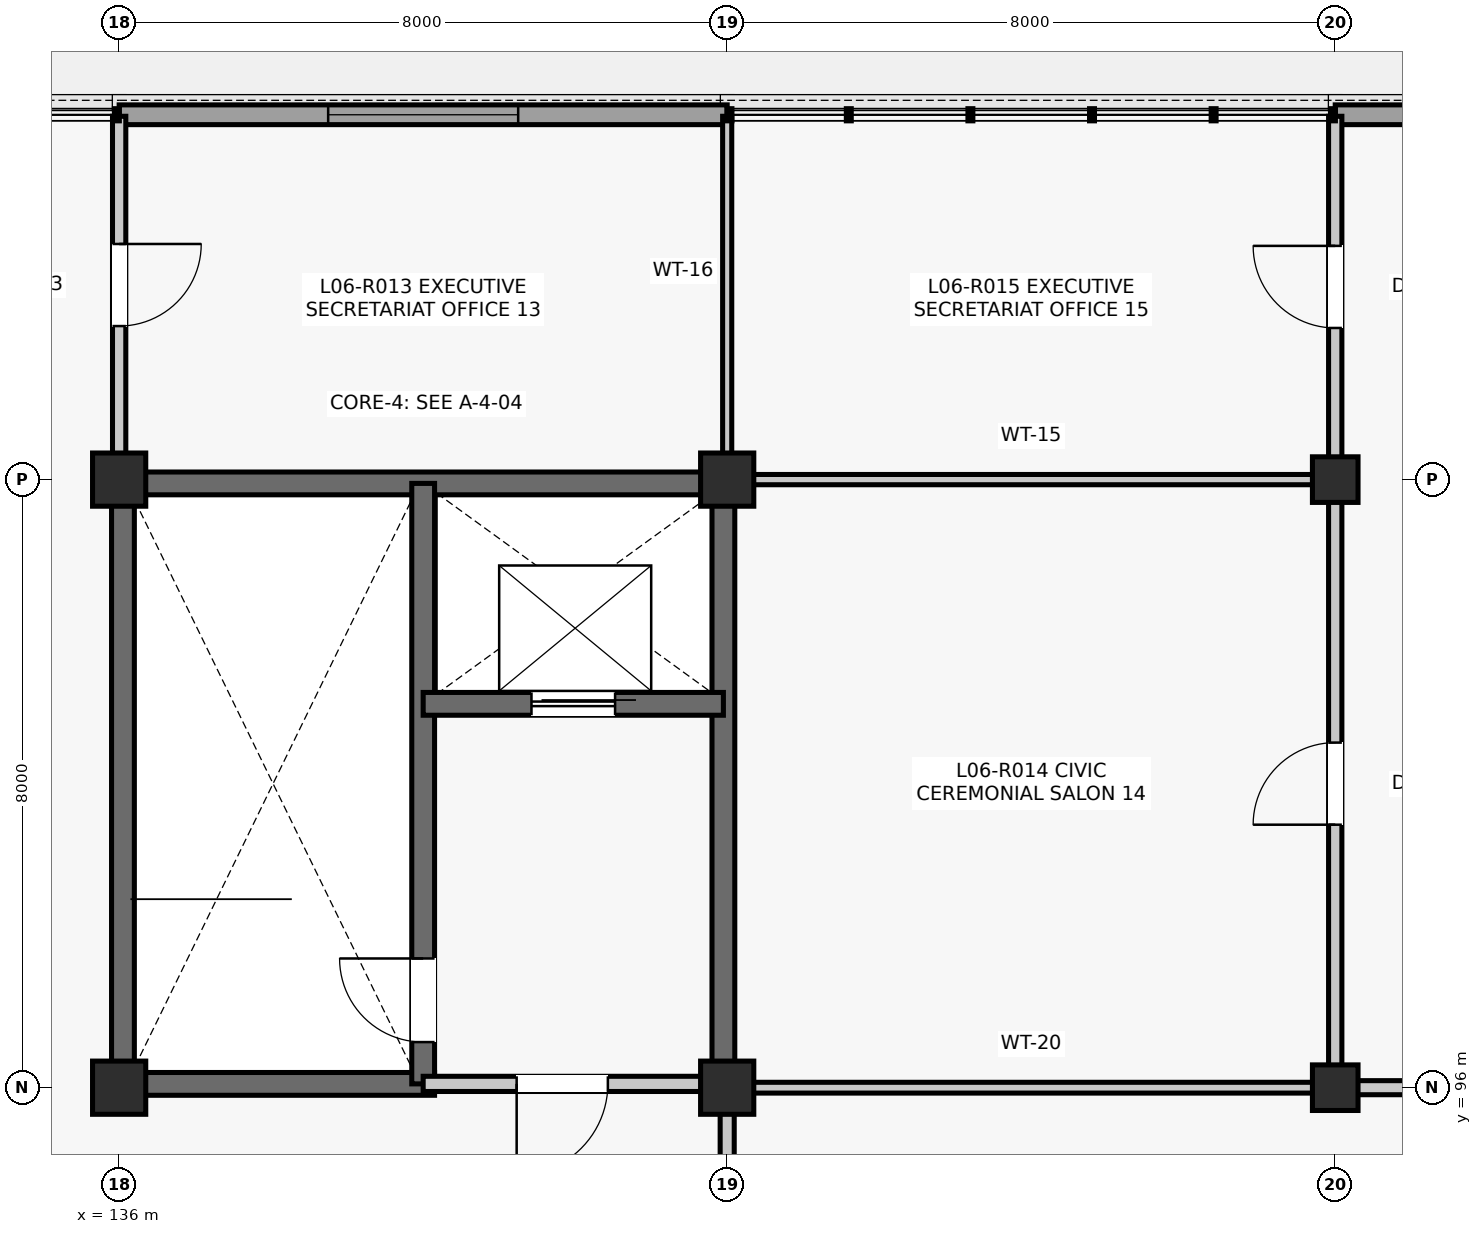
"""IFC4 building model, lengths in metres.
Left out: names, types, materials, properties, quantities, classifications, styles, units other than length and angle.
Written with IfcOpenShell. Run it as: python <this file> out.ifc"""

import sys

from ifc_helpers import new_model, si_unit, direction, frame, frame_2d, origin, origin_2d, place, context, subcontext, project, spatial, rectangle, extrude, element, fill, save


model = new_model("IFC4")
c1 = context("Model", 3, precision=1e-05, world=origin(), true_north=direction((0.0, 1.0)))
c2 = subcontext(c1, "Body", "Model", "MODEL_VIEW")
j1 = project(units=[si_unit("LENGTHUNIT", "METRE"), si_unit("PLANEANGLEUNIT", "RADIAN")], contexts=[c1])
p1 = place(None, origin())
s1 = spatial("IfcSite", under=j1, at=p1, CompositionType="ELEMENT")
p2 = place(p1, origin())
s2 = spatial("IfcBuilding", under=s1, at=p2, CompositionType="ELEMENT")
p3 = place(p2, frame((0.0, 0.0, 25.74)))
s3 = spatial("IfcBuildingStorey", under=s2, at=p3, CompositionType="ELEMENT", Elevation=25.74)
for number, where, z_axis, x_axis in (
    (1, (136.0, 96.0, 0.0), (0.0, 0.0, 1.0), (1.0, 0.0, 0.0)),
    (2, (136.0, 104.0, 0.0), (0.0, 0.0, 1.0), (1.0, 0.0, 0.0)),
    (3, (144.0, 96.0, 0.0), (0.0, 0.0, 1.0), (1.0, 0.0, 0.0)),
    (4, (144.0, 104.0, 0.0), (0.0, 0.0, 1.0), (1.0, 0.0, 0.0)),
):
    element("IfcColumn", number, at=place(p3, frame(where, z_axis=z_axis, x_axis=x_axis)), inside=s3, PredefinedType="COLUMN", context=c2, shape_type="SweptSolid", body=[
        extrude(rectangle(XDim=0.7, YDim=0.7, at=origin_2d()), origin(), (0.0, 0.0, 1.0), 4.29),
    ])
for number, where, z_axis, x_axis in (
    (5, (152.0, 96.0, 0.0), (0.0, 0.0, 1.0), (1.0, 0.0, 0.0)),
    (6, (152.0, 104.0, 0.0), (0.0, 0.0, 1.0), (1.0, 0.0, 0.0)),
):
    element("IfcColumn", number, at=place(p3, frame(where, z_axis=z_axis, x_axis=x_axis)), inside=s3, PredefinedType="COLUMN", context=c2, shape_type="SweptSolid", body=[
        extrude(rectangle(XDim=0.6, YDim=0.6, at=origin_2d()), origin(), (0.0, 0.0, 1.0), 4.29),
    ])
p4 = place(p3, frame((136.0, 108.8, 0.0), z_axis=(0.0, 0.0, 1.0), x_axis=(1.0, 0.0, 0.0)))
e7 = element("IfcWall", 7, at=p4, inside=s3, PredefinedType="SOLIDWALL", context=c2, shape_type="SweptSolid", body=[
    extrude(rectangle(XDim=8.0, YDim=0.26, at=frame_2d((4.0, 0.0))), origin(), (0.0, 0.0, 1.0), 4.09),
])
p5 = place(p4, frame((2.75, 0.0, 0.85)))
e8 = element("IfcOpeningElement", 8, at=p5, cuts=e7, PredefinedType="OPENING", context=c2, shape_type="SweptSolid", body=[
    extrude(rectangle(XDim=2.5, YDim=2.2, at=frame_2d((1.25, 1.1))), frame((0.0, 0.14, 0.0), z_axis=(0.0, -1.0, 0.0), x_axis=(1.0, 0.0, 0.0)), (0.0, 0.0, 1.0), 0.28),
])
p6 = place(p3, frame((152.0, 108.8, 0.0), z_axis=(0.0, 0.0, 1.0), x_axis=(1.0, 0.0, 0.0)))
e9 = element("IfcWall", 9, at=p6, inside=s3, PredefinedType="SOLIDWALL", context=c2, shape_type="SweptSolid", body=[
    extrude(rectangle(XDim=8.0, YDim=0.26, at=frame_2d((4.0, 0.0))), origin(), (0.0, 0.0, 1.0), 4.09),
])
p7 = place(p6, frame((2.75, 0.0, 0.85)))
e10 = element("IfcOpeningElement", 10, at=p7, cuts=e9, PredefinedType="OPENING", context=c2, shape_type="SweptSolid", body=[
    extrude(rectangle(XDim=2.5, YDim=2.2, at=frame_2d((1.25, 1.1))), frame((0.0, 0.14, 0.0), z_axis=(0.0, -1.0, 0.0), x_axis=(1.0, 0.0, 0.0)), (0.0, 0.0, 1.0), 0.28),
])
for number, where, z_axis, x_axis in (
    (11, (136.05, 96.24, 0.0), (0.0, 0.0, 1.0), (0.0, 1.0, 0.0)),
    (12, (136.24, 103.95, 0.0), (0.0, 0.0, 1.0), (1.0, 0.0, 0.0)),
    (13, (143.95, 96.24, 0.0), (0.0, 0.0, 1.0), (0.0, 1.0, 0.0)),
):
    element("IfcWall", number, at=place(p3, frame(where, z_axis=z_axis, x_axis=x_axis)), inside=s3, PredefinedType="SHEAR", context=c2, shape_type="SweptSolid", body=[
        extrude(rectangle(XDim=7.52, YDim=0.3, at=frame_2d((3.76, 0.0))), origin(), (0.0, 0.0, 1.0), 4.09),
    ])
p8 = place(p3, frame((136.24, 96.05, 0.0), z_axis=(0.0, 0.0, 1.0), x_axis=(1.0, 0.0, 0.0)))
e14 = element("IfcWall", 14, at=p8, inside=s3, PredefinedType="SHEAR", context=c2, shape_type="SweptSolid", body=[
    extrude(rectangle(XDim=3.91, YDim=0.3, at=frame_2d((1.955, 0.0))), origin(), (0.0, 0.0, 1.0), 4.09),
])
p9 = place(p3, frame((140.0, 96.05, 0.0), z_axis=(0.0, 0.0, 1.0), x_axis=(0.0, 1.0, 0.0)))
e15 = element("IfcWall", 15, at=p9, inside=s3, PredefinedType="SHEAR", context=c2, shape_type="SweptSolid", body=[
    extrude(rectangle(XDim=7.9, YDim=0.3, at=frame_2d((3.95, 0.0))), origin(), (0.0, 0.0, 1.0), 4.09),
])
p10 = place(p9, frame((0.55, 0.0, 0.0)))
e16 = element("IfcOpeningElement", 16, at=p10, cuts=e15, PredefinedType="OPENING", context=c2, shape_type="SweptSolid", body=[
    extrude(rectangle(XDim=1.1, YDim=2.15, at=frame_2d((0.55, 1.075))), frame((0.0, 0.16, 0.0), z_axis=(0.0, -1.0, 0.0), x_axis=(1.0, 0.0, 0.0)), (0.0, 0.0, 1.0), 0.32),
])
p11 = place(p3, frame((140.0, 101.05, 0.0), z_axis=(0.0, 0.0, 1.0), x_axis=(1.0, 0.0, 0.0)))
e17 = element("IfcWall", 17, at=p11, inside=s3, PredefinedType="SHEAR", context=c2, shape_type="SweptSolid", body=[
    extrude(rectangle(XDim=3.95, YDim=0.3, at=frame_2d((1.975, 0.0))), origin(), (0.0, 0.0, 1.0), 4.09),
])
p12 = place(p11, frame((1.425, 0.0, 0.0)))
e18 = element("IfcOpeningElement", 18, at=p12, cuts=e17, PredefinedType="OPENING", context=c2, shape_type="SweptSolid", body=[
    extrude(rectangle(XDim=1.1, YDim=2.2, at=frame_2d((0.55, 1.1))), frame((0.0, 0.16, 0.0), z_axis=(0.0, -1.0, 0.0), x_axis=(1.0, 0.0, 0.0)), (0.0, 0.0, 1.0), 0.32),
])
p13 = place(p3, frame((140.0, 96.05, 0.0), z_axis=(0.0, 0.0, 1.0), x_axis=(1.0, 0.0, 0.0)))
e19 = element("IfcWall", 19, at=p13, inside=s3, PredefinedType="PARTITIONING", context=c2, shape_type="SweptSolid", body=[
    extrude(rectangle(XDim=3.66, YDim=0.2, at=frame_2d((1.83, 0.0))), origin(), (0.0, 0.0, 1.0), 3.408),
])
p14 = place(p13, frame((1.23, 0.0, 0.0)))
e20 = element("IfcOpeningElement", 20, at=p14, cuts=e19, PredefinedType="OPENING", context=c2, shape_type="SweptSolid", body=[
    extrude(rectangle(XDim=1.2, YDim=2.15, at=frame_2d((0.6, 1.075))), frame((0.0, 0.11, 0.0), z_axis=(0.0, -1.0, 0.0), x_axis=(1.0, 0.0, 0.0)), (0.0, 0.0, 1.0), 0.22),
])
p15 = place(p3, frame((136.0, 104.34, 0.0), z_axis=(0.0, 0.0, 1.0), x_axis=(0.0, 1.0, 0.0)))
e21 = element("IfcWall", 21, at=p15, inside=s3, PredefinedType="PARTITIONING", context=c2, shape_type="SweptSolid", body=[
    extrude(rectangle(XDim=4.44, YDim=0.175, at=frame_2d((2.22, 0.0))), origin(), (0.0, 0.0, 1.0), 3.408),
])
p16 = place(p15, frame((1.68, 0.0, 0.0)))
e22 = element("IfcOpeningElement", 22, at=p16, cuts=e21, PredefinedType="OPENING", context=c2, shape_type="SweptSolid", body=[
    extrude(rectangle(XDim=1.08, YDim=2.2, at=frame_2d((0.54, 1.1))), frame((0.0, 0.097, 0.0), z_axis=(0.0, -1.0, 0.0), x_axis=(1.0, 0.0, 0.0)), (0.0, 0.0, 1.0), 0.195),
])
p17 = place(p3, frame((144.0, 91.22, 0.0), z_axis=(0.0, 0.0, 1.0), x_axis=(0.0, 1.0, 0.0)))
e23 = element("IfcWall", 23, at=p17, inside=s3, PredefinedType="PARTITIONING", context=c2, shape_type="SweptSolid", body=[
    extrude(rectangle(XDim=4.44, YDim=0.185, at=frame_2d((2.22, 0.0))), origin(), (0.0, 0.0, 1.0), 3.408),
])
p18 = place(p17, frame((1.32, 0.0, 0.0)))
e24 = element("IfcOpeningElement", 24, at=p18, cuts=e23, PredefinedType="OPENING", context=c2, shape_type="SweptSolid", body=[
    extrude(rectangle(XDim=1.8, YDim=2.35, at=frame_2d((0.9, 1.175))), frame((0.0, 0.103, 0.0), z_axis=(0.0, -1.0, 0.0), x_axis=(1.0, 0.0, 0.0)), (0.0, 0.0, 1.0), 0.205),
])
p19 = place(p3, frame((144.0, 104.34, 0.0), z_axis=(0.0, 0.0, 1.0), x_axis=(0.0, 1.0, 0.0)))
e25 = element("IfcWall", 25, at=p19, inside=s3, PredefinedType="PARTITIONING", context=c2, shape_type="SweptSolid", body=[
    extrude(rectangle(XDim=4.44, YDim=0.12, at=frame_2d((2.22, 0.0))), origin(), (0.0, 0.0, 1.0), 3.408),
])
p20 = place(p3, frame((144.34, 96.0, 0.0), z_axis=(0.0, 0.0, 1.0), x_axis=(1.0, 0.0, 0.0)))
e26 = element("IfcWall", 26, at=p20, inside=s3, PredefinedType="PARTITIONING", context=c2, shape_type="SweptSolid", body=[
    extrude(rectangle(XDim=7.37, YDim=0.142, at=frame_2d((3.685, 0.0))), origin(), (0.0, 0.0, 1.0), 3.408),
])
p21 = place(p3, frame((152.0, 96.29, 0.0), z_axis=(0.0, 0.0, 1.0), x_axis=(0.0, 1.0, 0.0)))
e27 = element("IfcWall", 27, at=p21, inside=s3, PredefinedType="PARTITIONING", context=c2, shape_type="SweptSolid", body=[
    extrude(rectangle(XDim=7.42, YDim=0.175, at=frame_2d((3.71, 0.0))), origin(), (0.0, 0.0, 1.0), 3.408),
])
p22 = place(p21, frame((3.17, 0.0, 0.0)))
e28 = element("IfcOpeningElement", 28, at=p22, cuts=e27, PredefinedType="OPENING", context=c2, shape_type="SweptSolid", body=[
    extrude(rectangle(XDim=1.08, YDim=2.2, at=frame_2d((0.54, 1.1))), frame((0.0, 0.097, 0.0), z_axis=(0.0, -1.0, 0.0), x_axis=(1.0, 0.0, 0.0)), (0.0, 0.0, 1.0), 0.195),
])
p23 = place(p3, frame((144.34, 104.0, 0.0), z_axis=(0.0, 0.0, 1.0), x_axis=(1.0, 0.0, 0.0)))
e29 = element("IfcWall", 29, at=p23, inside=s3, PredefinedType="PARTITIONING", context=c2, shape_type="SweptSolid", body=[
    extrude(rectangle(XDim=7.37, YDim=0.135, at=frame_2d((3.685, 0.0))), origin(), (0.0, 0.0, 1.0), 3.408),
])
p24 = place(p3, frame((152.0, 104.29, 0.0), z_axis=(0.0, 0.0, 1.0), x_axis=(0.0, 1.0, 0.0)))
e30 = element("IfcWall", 30, at=p24, inside=s3, PredefinedType="PARTITIONING", context=c2, shape_type="SweptSolid", body=[
    extrude(rectangle(XDim=4.49, YDim=0.175, at=frame_2d((2.245, 0.0))), origin(), (0.0, 0.0, 1.0), 3.408),
])
p25 = place(p24, frame((1.705, 0.0, 0.0)))
e31 = element("IfcOpeningElement", 31, at=p25, cuts=e30, PredefinedType="OPENING", context=c2, shape_type="SweptSolid", body=[
    extrude(rectangle(XDim=1.08, YDim=2.2, at=frame_2d((0.54, 1.1))), frame((0.0, 0.097, 0.0), z_axis=(0.0, -1.0, 0.0), x_axis=(1.0, 0.0, 0.0)), (0.0, 0.0, 1.0), 0.195),
])
p26 = place(p3, frame((152.29, 96.0, 0.0), z_axis=(0.0, 0.0, 1.0), x_axis=(1.0, 0.0, 0.0)))
e32 = element("IfcWall", 32, at=p26, inside=s3, PredefinedType="PARTITIONING", context=c2, shape_type="SweptSolid", body=[
    extrude(rectangle(XDim=7.37, YDim=0.185, at=frame_2d((3.685, 0.0))), origin(), (0.0, 0.0, 1.0), 3.408),
])
p27 = place(p26, frame((2.735, 0.0, 0.0)))
e33 = element("IfcOpeningElement", 33, at=p27, cuts=e32, PredefinedType="OPENING", context=c2, shape_type="SweptSolid", body=[
    extrude(rectangle(XDim=1.9, YDim=2.38, at=frame_2d((0.95, 1.19))), frame((0.0, 0.103, 0.0), z_axis=(0.0, -1.0, 0.0), x_axis=(1.0, 0.0, 0.0)), (0.0, 0.0, 1.0), 0.205),
])
p28 = place(p5, origin())
e34 = element("IfcWindow", 34, at=p28, inside=s3, PartitioningType="SINGLE_PANEL", PredefinedType="WINDOW", context=c2, shape_type="SweptSolid", body=[
    extrude(rectangle(XDim=2.5, YDim=2.2, at=frame_2d((1.25, 1.1))), frame((0.0, 0.03, 0.0), z_axis=(0.0, -1.0, 0.0), x_axis=(1.0, 0.0, 0.0)), (0.0, 0.0, 1.0), 0.06),
])
fill(e8, e34)
p29 = place(p10, origin())
e35 = element("IfcDoor", 35, at=p29, inside=s3, OperationType="SINGLE_SWING_RIGHT", PredefinedType="DOOR", context=c2, shape_type="SweptSolid", body=[
    extrude(rectangle(XDim=1.1, YDim=2.15, at=frame_2d((0.55, 1.075))), frame((0.0, 0.025, 0.0), z_axis=(0.0, -1.0, 0.0), x_axis=(1.0, 0.0, 0.0)), (0.0, 0.0, 1.0), 0.05),
])
fill(e16, e35)
p30 = place(p12, origin())
e36 = element("IfcDoor", 36, at=p30, inside=s3, OperationType="SLIDING_TO_LEFT", PredefinedType="DOOR", context=c2, shape_type="SweptSolid", body=[
    extrude(rectangle(XDim=1.1, YDim=2.2, at=frame_2d((0.55, 1.1))), frame((0.0, 0.025, 0.0), z_axis=(0.0, -1.0, 0.0), x_axis=(1.0, 0.0, 0.0)), (0.0, 0.0, 1.0), 0.05),
])
fill(e18, e36)
p31 = place(p14, frame((1.2, 0.0, 0.0), z_axis=(0.0, 0.0, 1.0), x_axis=(-1.0, 0.0, 0.0)))
e37 = element("IfcDoor", 37, at=p31, inside=s3, OperationType="SINGLE_SWING_LEFT", PredefinedType="DOOR", context=c2, shape_type="SweptSolid", body=[
    extrude(rectangle(XDim=1.2, YDim=2.15, at=frame_2d((0.6, 1.075))), frame((0.0, 0.025, 0.0), z_axis=(0.0, -1.0, 0.0), x_axis=(1.0, 0.0, 0.0)), (0.0, 0.0, 1.0), 0.05),
])
fill(e20, e37)
p32 = place(p16, frame((1.08, 0.0, 0.0), z_axis=(0.0, 0.0, 1.0), x_axis=(-1.0, 0.0, 0.0)))
e38 = element("IfcDoor", 38, at=p32, inside=s3, OperationType="SINGLE_SWING_RIGHT", PredefinedType="DOOR", context=c2, shape_type="SweptSolid", body=[
    extrude(rectangle(XDim=1.08, YDim=2.2, at=frame_2d((0.54, 1.1))), frame((0.0, 0.025, 0.0), z_axis=(0.0, -1.0, 0.0), x_axis=(1.0, 0.0, 0.0)), (0.0, 0.0, 1.0), 0.05),
])
fill(e22, e38)
p33 = place(p22, origin())
e39 = element("IfcDoor", 39, at=p33, inside=s3, OperationType="SINGLE_SWING_LEFT", PredefinedType="DOOR", context=c2, shape_type="SweptSolid", body=[
    extrude(rectangle(XDim=1.08, YDim=2.2, at=frame_2d((0.54, 1.1))), frame((0.0, 0.025, 0.0), z_axis=(0.0, -1.0, 0.0), x_axis=(1.0, 0.0, 0.0)), (0.0, 0.0, 1.0), 0.05),
])
fill(e28, e39)
p34 = place(p25, origin())
e40 = element("IfcDoor", 40, at=p34, inside=s3, OperationType="SINGLE_SWING_RIGHT", PredefinedType="DOOR", context=c2, shape_type="SweptSolid", body=[
    extrude(rectangle(XDim=1.08, YDim=2.2, at=frame_2d((0.54, 1.1))), frame((0.0, 0.025, 0.0), z_axis=(0.0, -1.0, 0.0), x_axis=(1.0, 0.0, 0.0)), (0.0, 0.0, 1.0), 0.05),
])
fill(e31, e40)
save(model, sys.argv[1])
